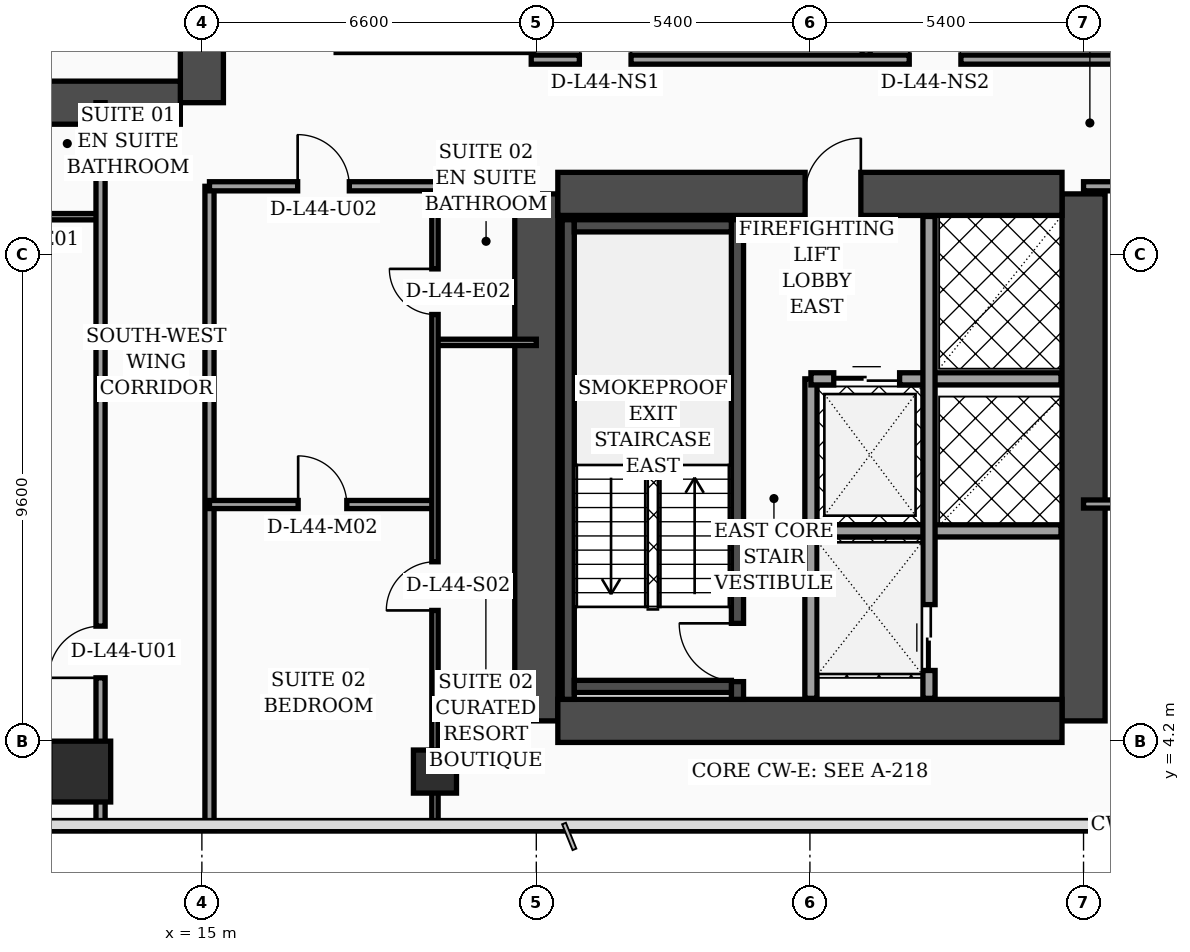
"""IFC4 building model, lengths in metres.
Left out: names, types, materials, properties, quantities, classifications, styles, units other than length and angle.
Written with IfcOpenShell. Run it as: python <this file> out.ifc"""

import sys

from ifc_helpers import new_model, si_unit, direction, frame, frame_2d, origin, origin_2d, place, context, subcontext, project, spatial, rectangle, hollow_rectangle, extrude, element, fill, save


model = new_model("IFC4")
c1 = context("Model", 3, precision=1e-05, world=origin(), true_north=direction((0.0, 1.0)))
c2 = subcontext(c1, "Body", "Model", "MODEL_VIEW")
j1 = project(units=[si_unit("LENGTHUNIT", "METRE"), si_unit("PLANEANGLEUNIT", "RADIAN")], contexts=[c1])
p1 = place(None, origin())
s1 = spatial("IfcSite", under=j1, at=p1, CompositionType="ELEMENT")
p2 = place(p1, origin())
s2 = spatial("IfcBuilding", under=s1, at=p2, CompositionType="ELEMENT")
p3 = place(p2, frame((0.0, 0.0, 178.9)))
s3 = spatial("IfcBuildingStorey", under=s2, at=p3, CompositionType="ELEMENT", Elevation=178.9)
p4 = place(p3, frame((15.0, 16.8, 0.0), z_axis=(0.0, 0.0, 1.0), x_axis=(0.0, 1.0, 0.0)))
e1 = element("IfcWall", 1, at=p4, inside=s3, PredefinedType="SHEAR", context=c2, shape_type="SweptSolid", body=[
    extrude(rectangle(XDim=21.6, YDim=0.85, at=frame_2d((10.8, 0.0))), origin(), (0.0, 0.0, 1.0), 3.56),
])
p5 = place(p4, frame((8.65, 0.0, 0.0)))
e2 = element("IfcOpeningElement", 2, at=p5, cuts=e1, PredefinedType="OPENING", context=c2, shape_type="SweptSolid", body=[
    extrude(rectangle(XDim=1.1, YDim=2.2, at=frame_2d((0.55, 1.1))), frame((0.0, 0.435, 0.0), z_axis=(0.0, -1.0, 0.0), x_axis=(1.0, 0.0, 0.0)), (0.0, 0.0, 1.0), 0.87),
])
p6 = place(p4, frame((10.85, 0.0, 0.0)))
e3 = element("IfcOpeningElement", 3, at=p6, cuts=e1, PredefinedType="OPENING", context=c2, shape_type="SweptSolid", body=[
    extrude(rectangle(XDim=1.1, YDim=2.2, at=frame_2d((0.55, 1.1))), frame((0.0, 0.435, 0.0), z_axis=(0.0, -1.0, 0.0), x_axis=(1.0, 0.0, 0.0)), (0.0, 0.0, 1.0), 0.87),
])
p7 = place(p4, frame((13.5, 0.0, 0.0)))
e4 = element("IfcOpeningElement", 4, at=p7, cuts=e1, PredefinedType="OPENING", context=c2, shape_type="SweptSolid", body=[
    extrude(rectangle(XDim=1.1, YDim=2.2, at=frame_2d((0.55, 1.1))), frame((0.0, 0.435, 0.0), z_axis=(0.0, -1.0, 0.0), x_axis=(1.0, 0.0, 0.0)), (0.0, 0.0, 1.0), 0.87),
])
p8 = place(p4, frame((16.15, 0.0, 0.0)))
e5 = element("IfcOpeningElement", 5, at=p8, cuts=e1, PredefinedType="OPENING", context=c2, shape_type="SweptSolid", body=[
    extrude(rectangle(XDim=1.1, YDim=2.2, at=frame_2d((0.55, 1.1))), frame((0.0, 0.435, 0.0), z_axis=(0.0, -1.0, 0.0), x_axis=(1.0, 0.0, 0.0)), (0.0, 0.0, 1.0), 0.87),
])
p9 = place(p3, frame((4.625, 16.8, 0.0), z_axis=(0.0, 0.0, 1.0), x_axis=(1.0, 0.0, 0.0)))
e6 = element("IfcWall", 6, at=p9, inside=s3, PredefinedType="SHEAR", context=c2, shape_type="SweptSolid", body=[
    extrude(rectangle(XDim=9.95, YDim=0.85, at=frame_2d((4.975, 0.0))), origin(), (0.0, 0.0, 1.0), 3.56),
])
for number, where, z_axis, x_axis in (
    (7, (21.6, 4.6, 0.0), (0.0, 0.0, 1.0), (0.0, 1.0, 0.0)),
    (8, (32.4, 4.6, 0.0), (0.0, 0.0, 1.0), (0.0, 1.0, 0.0)),
):
    element("IfcWall", number, at=place(p3, frame(where, z_axis=z_axis, x_axis=x_axis)), inside=s3, PredefinedType="SHEAR", context=c2, shape_type="SweptSolid", body=[
        extrude(rectangle(XDim=10.4, YDim=0.85, at=frame_2d((5.2, 0.0))), origin(), (0.0, 0.0, 1.0), 3.56),
    ])
p10 = place(p3, frame((22.025, 15.0, 0.0), z_axis=(0.0, 0.0, 1.0), x_axis=(1.0, 0.0, 0.0)))
e9 = element("IfcWall", 9, at=p10, inside=s3, PredefinedType="SHEAR", context=c2, shape_type="SweptSolid", body=[
    extrude(rectangle(XDim=9.95, YDim=0.85, at=frame_2d((4.975, 0.0))), origin(), (0.0, 0.0, 1.0), 3.56),
])
p11 = place(p10, frame((4.88, 0.0, 0.0)))
e10 = element("IfcOpeningElement", 10, at=p11, cuts=e9, PredefinedType="OPENING", context=c2, shape_type="SweptSolid", body=[
    extrude(rectangle(XDim=1.1, YDim=2.2, at=frame_2d((0.55, 1.1))), frame((0.0, 0.435, 0.0), z_axis=(0.0, -1.0, 0.0), x_axis=(1.0, 0.0, 0.0)), (0.0, 0.0, 1.0), 0.87),
])
p12 = place(p3, frame((22.025, 4.6, 0.0), z_axis=(0.0, 0.0, 1.0), x_axis=(1.0, 0.0, 0.0)))
e11 = element("IfcWall", 11, at=p12, inside=s3, PredefinedType="SHEAR", context=c2, shape_type="SweptSolid", body=[
    extrude(rectangle(XDim=9.95, YDim=0.85, at=frame_2d((4.975, 0.0))), origin(), (0.0, 0.0, 1.0), 3.56),
])
p13 = place(p3, frame((22.23, 5.025, 0.0), z_axis=(0.0, 0.0, 1.0), x_axis=(0.0, 1.0, 0.0)))
e12 = element("IfcWall", 12, at=p13, inside=s3, PredefinedType="SOLIDWALL", context=c2, shape_type="SweptSolid", body=[
    extrude(rectangle(XDim=9.465, YDim=0.24, at=frame_2d((4.732, 0.0))), origin(), (0.0, 0.0, 1.0), 3.56),
])
p14 = place(p3, frame((25.57, 5.025, 0.0), z_axis=(0.0, 0.0, 1.0), x_axis=(0.0, 1.0, 0.0)))
e13 = element("IfcWall", 13, at=p14, inside=s3, PredefinedType="SOLIDWALL", context=c2, shape_type="SweptSolid", body=[
    extrude(rectangle(XDim=9.465, YDim=0.24, at=frame_2d((4.732, 0.0))), origin(), (0.0, 0.0, 1.0), 3.56),
])
p15 = place(p14, frame((0.35, 0.0, 0.0)))
e14 = element("IfcOpeningElement", 14, at=p15, cuts=e13, PredefinedType="OPENING", context=c2, shape_type="SweptSolid", body=[
    extrude(rectangle(XDim=1.15, YDim=2.2, at=frame_2d((0.575, 1.1))), frame((0.0, 0.13, 0.0), z_axis=(0.0, -1.0, 0.0), x_axis=(1.0, 0.0, 0.0)), (0.0, 0.0, 1.0), 0.26),
])
for number, where, z_axis, x_axis in (
    (15, (22.35, 5.28, 0.0), (0.0, 0.0, 1.0), (1.0, 0.0, 0.0)),
    (16, (22.35, 14.37, 0.0), (0.0, 0.0, 1.0), (1.0, 0.0, 0.0)),
):
    element("IfcWall", number, at=place(p3, frame(where, z_axis=z_axis, x_axis=x_axis)), inside=s3, PredefinedType="SOLIDWALL", context=c2, shape_type="SweptSolid", body=[
        extrude(rectangle(XDim=3.1, YDim=0.24, at=frame_2d((1.55, 0.0))), origin(), (0.0, 0.0, 1.0), 3.56),
    ])
p16 = place(p3, frame((12.6, 3.6, 0.0), z_axis=(0.0, 0.0, 1.0), x_axis=(1.0, 0.0, 0.0)))
e17 = element("IfcColumn", 17, at=p16, inside=s3, PredefinedType="COLUMN", context=c2, shape_type="SweptSolid", body=[
    extrude(rectangle(XDim=1.2, YDim=1.2, at=origin_2d()), origin(), (0.0, 0.0, 1.0), 3.56),
])
p17 = place(p3, frame((19.6, 3.6, 0.0), z_axis=(0.0, 0.0, 1.0), x_axis=(1.0, 0.0, 0.0)))
e18 = element("IfcColumn", 18, at=p17, inside=s3, PredefinedType="COLUMN", context=c2, shape_type="SweptSolid", body=[
    extrude(hollow_rectangle(XDim=0.85, YDim=0.85, WallThickness=0.036, at=origin_2d()), origin(), (0.0, 0.0, 1.0), 3.56),
])
p18 = place(p3, frame((27.02, 5.045, 0.0), z_axis=(0.0, 0.0, 1.0), x_axis=(0.0, 1.0, 0.0)))
e19 = element("IfcWall", 19, at=p18, inside=s3, PredefinedType="SOLIDWALL", context=c2, shape_type="SweptSolid", body=[
    extrude(rectangle(XDim=6.305, YDim=0.24, at=frame_2d((3.153, 0.0))), origin(), (0.0, 0.0, 1.0), 3.56),
])
p19 = place(p3, frame((27.02, 11.35, 0.0), z_axis=(0.0, 0.0, 1.0), x_axis=(1.0, 0.0, 0.0)))
e20 = element("IfcWall", 20, at=p19, inside=s3, PredefinedType="SOLIDWALL", context=c2, shape_type="SweptSolid", body=[
    extrude(rectangle(XDim=4.935, YDim=0.24, at=frame_2d((2.468, 0.0))), origin(), (0.0, 0.0, 1.0), 3.56),
])
p20 = place(p19, frame((0.45, 0.0, 0.0)))
e21 = element("IfcOpeningElement", 21, at=p20, cuts=e20, PredefinedType="OPENING", context=c2, shape_type="SweptSolid", body=[
    extrude(rectangle(XDim=1.3, YDim=2.35, at=frame_2d((0.65, 1.175))), frame((0.0, 0.13, 0.0), z_axis=(0.0, -1.0, 0.0), x_axis=(1.0, 0.0, 0.0)), (0.0, 0.0, 1.0), 0.26),
])
p21 = place(p3, frame((27.02, 8.35, 0.0), z_axis=(0.0, 0.0, 1.0), x_axis=(1.0, 0.0, 0.0)))
e22 = element("IfcWall", 22, at=p21, inside=s3, PredefinedType="SOLIDWALL", context=c2, shape_type="SweptSolid", body=[
    extrude(rectangle(XDim=4.935, YDim=0.24, at=frame_2d((2.468, 0.0))), origin(), (0.0, 0.0, 1.0), 3.56),
])
p22 = place(p3, frame((29.35, 5.045, 0.0), z_axis=(0.0, 0.0, 1.0), x_axis=(0.0, 1.0, 0.0)))
e23 = element("IfcWall", 23, at=p22, inside=s3, PredefinedType="SOLIDWALL", context=c2, shape_type="SweptSolid", body=[
    extrude(rectangle(XDim=9.51, YDim=0.24, at=frame_2d((4.755, 0.0))), origin(), (0.0, 0.0, 1.0), 3.56),
])
p23 = place(p22, frame((0.55, 0.0, 0.0)))
e24 = element("IfcOpeningElement", 24, at=p23, cuts=e23, PredefinedType="OPENING", context=c2, shape_type="SweptSolid", body=[
    extrude(rectangle(XDim=1.3, YDim=2.35, at=frame_2d((0.65, 1.175))), frame((0.0, 0.13, 0.0), z_axis=(0.0, -1.0, 0.0), x_axis=(1.0, 0.0, 0.0)), (0.0, 0.0, 1.0), 0.26),
])
p24 = place(p3, frame((3.2, 14.55, 0.0), z_axis=(0.0, 0.0, 1.0), x_axis=(1.0, 0.0, 0.0)))
e25 = element("IfcWall", 25, at=p24, inside=s3, PredefinedType="PARTITIONING", context=c2, shape_type="SweptSolid", body=[
    extrude(rectangle(XDim=9.8, YDim=0.125, at=frame_2d((4.9, 0.0))), origin(), (0.0, 0.0, 1.0), 2.94),
])
p25 = place(p24, frame((3.32, 0.0, 0.0)))
e26 = element("IfcOpeningElement", 26, at=p25, cuts=e25, PredefinedType="OPENING", context=c2, shape_type="SweptSolid", body=[
    extrude(rectangle(XDim=0.96, YDim=2.2, at=frame_2d((0.48, 1.1))), frame((0.0, 0.073, 0.0), z_axis=(0.0, -1.0, 0.0), x_axis=(1.0, 0.0, 0.0)), (0.0, 0.0, 1.0), 0.145),
])
p26 = place(p24, frame((7.89, 0.0, 0.0)))
e27 = element("IfcOpeningElement", 27, at=p26, cuts=e25, PredefinedType="OPENING", context=c2, shape_type="SweptSolid", body=[
    extrude(rectangle(XDim=0.9, YDim=2.15, at=frame_2d((0.45, 1.075))), frame((0.0, 0.073, 0.0), z_axis=(0.0, -1.0, 0.0), x_axis=(1.0, 0.0, 0.0)), (0.0, 0.0, 1.0), 0.145),
])
p27 = place(p3, frame((13.0, 2.44, 0.0), z_axis=(0.0, 0.0, 1.0), x_axis=(0.0, 1.0, 0.0)))
e28 = element("IfcWall", 28, at=p27, inside=s3, PredefinedType="PARTITIONING", context=c2, shape_type="SweptSolid", body=[
    extrude(rectangle(XDim=14.36, YDim=0.18, at=frame_2d((7.18, 0.0))), origin(), (0.0, 0.0, 1.0), 2.94),
])
p28 = place(p27, frame((3.01, 0.0, 0.0)))
e29 = element("IfcOpeningElement", 29, at=p28, cuts=e28, PredefinedType="OPENING", context=c2, shape_type="SweptSolid", body=[
    extrude(rectangle(XDim=1.02, YDim=2.2, at=frame_2d((0.51, 1.1))), frame((0.0, 0.1, 0.0), z_axis=(0.0, -1.0, 0.0), x_axis=(1.0, 0.0, 0.0)), (0.0, 0.0, 1.0), 0.2),
])
p29 = place(p3, frame((15.15, 2.44, 0.0), z_axis=(0.0, 0.0, 1.0), x_axis=(0.0, 1.0, 0.0)))
e30 = element("IfcWall", 30, at=p29, inside=s3, PredefinedType="PARTITIONING", context=c2, shape_type="SweptSolid", body=[
    extrude(rectangle(XDim=12.71, YDim=0.18, at=frame_2d((6.355, 0.0))), origin(), (0.0, 0.0, 1.0), 3.04),
])
p30 = place(p3, frame((19.6, 12.07, 0.0), z_axis=(0.0, 0.0, 1.0), x_axis=(1.0, 0.0, 0.0)))
e31 = element("IfcWall", 31, at=p30, inside=s3, PredefinedType="PARTITIONING", context=c2, shape_type="SweptSolid", body=[
    extrude(rectangle(XDim=2.0, YDim=0.125, at=frame_2d((1.0, 0.0))), origin(), (0.0, 0.0, 1.0), 3.56),
])
p31 = place(p3, frame((15.15, 8.87, 0.0), z_axis=(0.0, 0.0, 1.0), x_axis=(1.0, 0.0, 0.0)))
e32 = element("IfcWall", 32, at=p31, inside=s3, PredefinedType="PARTITIONING", context=c2, shape_type="SweptSolid", body=[
    extrude(rectangle(XDim=4.45, YDim=0.16, at=frame_2d((2.225, 0.0))), origin(), (0.0, 0.0, 1.0), 3.56),
])
p32 = place(p31, frame((1.75, 0.0, 0.0)))
e33 = element("IfcOpeningElement", 33, at=p32, cuts=e32, PredefinedType="OPENING", context=c2, shape_type="SweptSolid", body=[
    extrude(rectangle(XDim=0.96, YDim=2.2, at=frame_2d((0.48, 1.1))), frame((0.0, 0.09, 0.0), z_axis=(0.0, -1.0, 0.0), x_axis=(1.0, 0.0, 0.0)), (0.0, 0.0, 1.0), 0.18),
])
p33 = place(p3, frame((19.6, 2.44, 0.0), z_axis=(0.0, 0.0, 1.0), x_axis=(0.0, 1.0, 0.0)))
e34 = element("IfcWall", 34, at=p33, inside=s3, PredefinedType="PARTITIONING", context=c2, shape_type="SweptSolid", body=[
    extrude(rectangle(XDim=12.71, YDim=0.125, at=frame_2d((6.355, 0.0))), origin(), (0.0, 0.0, 1.0), 2.49),
])
p34 = place(p33, frame((4.34, 0.0, 0.0)))
e35 = element("IfcOpeningElement", 35, at=p34, cuts=e34, PredefinedType="OPENING", context=c2, shape_type="SweptSolid", body=[
    extrude(rectangle(XDim=0.96, YDim=2.2, at=frame_2d((0.48, 1.1))), frame((0.0, 0.073, 0.0), z_axis=(0.0, -1.0, 0.0), x_axis=(1.0, 0.0, 0.0)), (0.0, 0.0, 1.0), 0.145),
])
p35 = place(p33, frame((10.18, 0.0, 0.0)))
e36 = element("IfcOpeningElement", 36, at=p35, cuts=e34, PredefinedType="OPENING", context=c2, shape_type="SweptSolid", body=[
    extrude(rectangle(XDim=0.9, YDim=2.15, at=frame_2d((0.45, 1.075))), frame((0.0, 0.073, 0.0), z_axis=(0.0, -1.0, 0.0), x_axis=(1.0, 0.0, 0.0)), (0.0, 0.0, 1.0), 0.145),
])
p36 = place(p3, frame((15.15, 15.15, 0.0), z_axis=(0.0, 0.0, 1.0), x_axis=(1.0, 0.0, 0.0)))
e37 = element("IfcWall", 37, at=p36, inside=s3, PredefinedType="PARTITIONING", context=c2, shape_type="SweptSolid", body=[
    extrude(rectangle(XDim=6.45, YDim=0.18, at=frame_2d((3.225, 0.0))), origin(), (0.0, 0.0, 1.0), 2.49),
])
p37 = place(p36, frame((1.74, 0.0, 0.0)))
e38 = element("IfcOpeningElement", 38, at=p37, cuts=e37, PredefinedType="OPENING", context=c2, shape_type="SweptSolid", body=[
    extrude(rectangle(XDim=1.02, YDim=2.2, at=frame_2d((0.51, 1.1))), frame((0.0, 0.1, 0.0), z_axis=(0.0, -1.0, 0.0), x_axis=(1.0, 0.0, 0.0)), (0.0, 0.0, 1.0), 0.2),
])
p38 = place(p3, frame((17.65, 17.88, 0.0), z_axis=(0.0, 0.0, 1.0), x_axis=(1.0, 0.0, 0.0)))
e39 = element("IfcWall", 39, at=p38, inside=s3, PredefinedType="PARTITIONING", context=c2, shape_type="SweptSolid", body=[
    extrude(rectangle(XDim=3.9, YDim=0.18, at=frame_2d((1.95, 0.0))), origin(), (0.0, 0.0, 1.0), 3.56),
])
p39 = place(p3, frame((32.4, 8.88, 0.0), z_axis=(0.0, 0.0, 1.0), x_axis=(1.0, 0.0, 0.0)))
e40 = element("IfcWall", 40, at=p39, inside=s3, PredefinedType="PARTITIONING", context=c2, shape_type="SweptSolid", body=[
    extrude(rectangle(XDim=4.15, YDim=0.16, at=frame_2d((2.075, 0.0))), origin(), (0.0, 0.0, 1.0), 2.94),
])
p40 = place(p39, frame((1.59, 0.0, 0.0)))
e41 = element("IfcOpeningElement", 41, at=p40, cuts=e40, PredefinedType="OPENING", context=c2, shape_type="SweptSolid", body=[
    extrude(rectangle(XDim=0.96, YDim=2.2, at=frame_2d((0.48, 1.1))), frame((0.0, 0.09, 0.0), z_axis=(0.0, -1.0, 0.0), x_axis=(1.0, 0.0, 0.0)), (0.0, 0.0, 1.0), 0.18),
])
p41 = place(p3, frame((32.4, 15.15, 0.0), z_axis=(0.0, 0.0, 1.0), x_axis=(1.0, 0.0, 0.0)))
e42 = element("IfcWall", 42, at=p41, inside=s3, PredefinedType="PARTITIONING", context=c2, shape_type="SweptSolid", body=[
    extrude(rectangle(XDim=15.0, YDim=0.18, at=frame_2d((7.5, 0.0))), origin(), (0.0, 0.0, 1.0), 2.94),
])
p42 = place(p41, frame((1.66, 0.0, 0.0)))
e43 = element("IfcOpeningElement", 43, at=p42, cuts=e42, PredefinedType="OPENING", context=c2, shape_type="SweptSolid", body=[
    extrude(rectangle(XDim=1.02, YDim=2.2, at=frame_2d((0.51, 1.1))), frame((0.0, 0.1, 0.0), z_axis=(0.0, -1.0, 0.0), x_axis=(1.0, 0.0, 0.0)), (0.0, 0.0, 1.0), 0.2),
])
p43 = place(p41, frame((10.79, 0.0, 0.0)))
e44 = element("IfcOpeningElement", 44, at=p43, cuts=e42, PredefinedType="OPENING", context=c2, shape_type="SweptSolid", body=[
    extrude(rectangle(XDim=1.02, YDim=2.2, at=frame_2d((0.51, 1.1))), frame((0.0, 0.1, 0.0), z_axis=(0.0, -1.0, 0.0), x_axis=(1.0, 0.0, 0.0)), (0.0, 0.0, 1.0), 0.2),
])
p44 = place(p41, frame((6.62, 0.0, 0.0)))
e45 = element("IfcOpeningElement", 45, at=p44, cuts=e42, PredefinedType="OPENING", context=c2, shape_type="SweptSolid", body=[
    extrude(rectangle(XDim=1.02, YDim=2.2, at=frame_2d((0.51, 1.1))), frame((0.0, 0.1, 0.0), z_axis=(0.0, -1.0, 0.0), x_axis=(1.0, 0.0, 0.0)), (0.0, 0.0, 1.0), 0.2),
])
p45 = place(p3, frame((28.11, 17.65, 0.0), z_axis=(0.0, 0.0, 1.0), x_axis=(0.0, 1.0, 0.0)))
e46 = element("IfcWall", 46, at=p45, inside=s3, PredefinedType="PARTITIONING", context=c2, shape_type="SweptSolid", body=[
    extrude(rectangle(XDim=10.46, YDim=0.16, at=frame_2d((5.23, 0.0))), origin(), (0.0, 0.0, 1.0), 2.94),
])
p46 = place(p3, frame((21.5, 17.65, 0.0), z_axis=(0.0, 0.0, 1.0), x_axis=(1.0, 0.0, 0.0)))
e47 = element("IfcWall", 47, at=p46, inside=s3, PredefinedType="PARTITIONING", context=c2, shape_type="SweptSolid", body=[
    extrude(rectangle(XDim=23.55, YDim=0.18, at=frame_2d((11.775, 0.0))), origin(), (0.0, 0.0, 1.0), 2.94),
])
p47 = place(p46, frame((0.95, 0.0, 0.0)))
e48 = element("IfcOpeningElement", 48, at=p47, cuts=e47, PredefinedType="OPENING", context=c2, shape_type="SweptSolid", body=[
    extrude(rectangle(XDim=1.02, YDim=2.2, at=frame_2d((0.51, 1.1))), frame((0.0, 0.1, 0.0), z_axis=(0.0, -1.0, 0.0), x_axis=(1.0, 0.0, 0.0)), (0.0, 0.0, 1.0), 0.2),
])
p48 = place(p46, frame((7.46, 0.0, 0.0)))
e49 = element("IfcOpeningElement", 49, at=p48, cuts=e47, PredefinedType="OPENING", context=c2, shape_type="SweptSolid", body=[
    extrude(rectangle(XDim=1.02, YDim=2.2, at=frame_2d((0.51, 1.1))), frame((0.0, 0.1, 0.0), z_axis=(0.0, -1.0, 0.0), x_axis=(1.0, 0.0, 0.0)), (0.0, 0.0, 1.0), 0.2),
])
p49 = place(p46, frame((12.68, 0.0, 0.0)))
e50 = element("IfcOpeningElement", 50, at=p49, cuts=e47, PredefinedType="OPENING", context=c2, shape_type="SweptSolid", body=[
    extrude(rectangle(XDim=1.02, YDim=2.2, at=frame_2d((0.51, 1.1))), frame((0.0, 0.1, 0.0), z_axis=(0.0, -1.0, 0.0), x_axis=(1.0, 0.0, 0.0)), (0.0, 0.0, 1.0), 0.2),
])
p50 = place(p46, frame((18.54, 0.0, 0.0)))
e51 = element("IfcOpeningElement", 51, at=p50, cuts=e47, PredefinedType="OPENING", context=c2, shape_type="SweptSolid", body=[
    extrude(rectangle(XDim=1.02, YDim=2.2, at=frame_2d((0.51, 1.1))), frame((0.0, 0.1, 0.0), z_axis=(0.0, -1.0, 0.0), x_axis=(1.0, 0.0, 0.0)), (0.0, 0.0, 1.0), 0.2),
])
p51 = place(p20, origin())
e52 = element("IfcDoor", 52, at=p51, inside=s3, OperationType="DOUBLE_DOOR_SLIDING", PredefinedType="DOOR", context=c2, shape_type="SweptSolid", body=[
    extrude(rectangle(XDim=1.3, YDim=2.35, at=frame_2d((0.65, 1.175))), frame((0.0, 0.025, 0.0), z_axis=(0.0, -1.0, 0.0), x_axis=(1.0, 0.0, 0.0)), (0.0, 0.0, 1.0), 0.05),
])
fill(e21, e52)
p52 = place(p23, origin())
e53 = element("IfcDoor", 53, at=p52, inside=s3, OperationType="DOUBLE_DOOR_SLIDING", PredefinedType="DOOR", context=c2, shape_type="SweptSolid", body=[
    extrude(rectangle(XDim=1.3, YDim=2.35, at=frame_2d((0.65, 1.175))), frame((0.0, 0.025, 0.0), z_axis=(0.0, -1.0, 0.0), x_axis=(1.0, 0.0, 0.0)), (0.0, 0.0, 1.0), 0.05),
])
fill(e24, e53)
p53 = place(p28, origin())
e54 = element("IfcDoor", 54, at=p53, inside=s3, OperationType="SINGLE_SWING_LEFT", PredefinedType="DOOR", context=c2, shape_type="SweptSolid", body=[
    extrude(rectangle(XDim=1.02, YDim=2.2, at=frame_2d((0.51, 1.1))), frame((0.0, 0.025, 0.0), z_axis=(0.0, -1.0, 0.0), x_axis=(1.0, 0.0, 0.0)), (0.0, 0.0, 1.0), 0.05),
])
fill(e29, e54)
p54 = place(p32, origin())
e55 = element("IfcDoor", 55, at=p54, inside=s3, OperationType="SINGLE_SWING_LEFT", PredefinedType="DOOR", context=c2, shape_type="SweptSolid", body=[
    extrude(rectangle(XDim=0.96, YDim=2.2, at=frame_2d((0.48, 1.1))), frame((0.0, 0.025, 0.0), z_axis=(0.0, -1.0, 0.0), x_axis=(1.0, 0.0, 0.0)), (0.0, 0.0, 1.0), 0.05),
])
fill(e33, e55)
p55 = place(p34, origin())
e56 = element("IfcDoor", 56, at=p55, inside=s3, OperationType="SINGLE_SWING_LEFT", PredefinedType="DOOR", context=c2, shape_type="SweptSolid", body=[
    extrude(rectangle(XDim=0.96, YDim=2.2, at=frame_2d((0.48, 1.1))), frame((0.0, 0.025, 0.0), z_axis=(0.0, -1.0, 0.0), x_axis=(1.0, 0.0, 0.0)), (0.0, 0.0, 1.0), 0.05),
])
fill(e35, e56)
p56 = place(p35, origin())
e57 = element("IfcDoor", 57, at=p56, inside=s3, OperationType="SINGLE_SWING_RIGHT", PredefinedType="DOOR", context=c2, shape_type="SweptSolid", body=[
    extrude(rectangle(XDim=0.9, YDim=2.15, at=frame_2d((0.45, 1.075))), frame((0.0, 0.025, 0.0), z_axis=(0.0, -1.0, 0.0), x_axis=(1.0, 0.0, 0.0)), (0.0, 0.0, 1.0), 0.05),
])
fill(e36, e57)
p57 = place(p37, origin())
e58 = element("IfcDoor", 58, at=p57, inside=s3, OperationType="SINGLE_SWING_LEFT", PredefinedType="DOOR", context=c2, shape_type="SweptSolid", body=[
    extrude(rectangle(XDim=1.02, YDim=2.2, at=frame_2d((0.51, 1.1))), frame((0.0, 0.025, 0.0), z_axis=(0.0, -1.0, 0.0), x_axis=(1.0, 0.0, 0.0)), (0.0, 0.0, 1.0), 0.05),
])
fill(e38, e58)
p58 = place(p47, origin())
e59 = element("IfcDoor", 59, at=p58, inside=s3, OperationType="SINGLE_SWING_RIGHT", PredefinedType="DOOR", context=c2, shape_type="SweptSolid", body=[
    extrude(rectangle(XDim=1.02, YDim=2.2, at=frame_2d((0.51, 1.1))), frame((0.0, 0.025, 0.0), z_axis=(0.0, -1.0, 0.0), x_axis=(1.0, 0.0, 0.0)), (0.0, 0.0, 1.0), 0.05),
])
fill(e48, e59)
p59 = place(p48, origin())
e60 = element("IfcDoor", 60, at=p59, inside=s3, OperationType="SINGLE_SWING_LEFT", PredefinedType="DOOR", context=c2, shape_type="SweptSolid", body=[
    extrude(rectangle(XDim=1.02, YDim=2.2, at=frame_2d((0.51, 1.1))), frame((0.0, 0.025, 0.0), z_axis=(0.0, -1.0, 0.0), x_axis=(1.0, 0.0, 0.0)), (0.0, 0.0, 1.0), 0.05),
])
fill(e49, e60)
p60 = place(p15, origin())
e61 = element("IfcDoor", 61, at=p60, inside=s3, OperationType="SINGLE_SWING_RIGHT", PredefinedType="DOOR", context=c2, shape_type="SweptSolid", body=[
    extrude(rectangle(XDim=1.15, YDim=2.2, at=frame_2d((0.575, 1.1))), frame((0.0, 0.025, 0.0), z_axis=(0.0, -1.0, 0.0), x_axis=(1.0, 0.0, 0.0)), (0.0, 0.0, 1.0), 0.05),
])
fill(e14, e61)
p61 = place(p11, origin())
e62 = element("IfcDoor", 62, at=p61, inside=s3, OperationType="SINGLE_SWING_RIGHT", PredefinedType="DOOR", context=c2, shape_type="SweptSolid", body=[
    extrude(rectangle(XDim=1.1, YDim=2.2, at=frame_2d((0.55, 1.1))), frame((0.0, 0.025, 0.0), z_axis=(0.0, -1.0, 0.0), x_axis=(1.0, 0.0, 0.0)), (0.0, 0.0, 1.0), 0.05),
])
fill(e10, e62)
save(model, sys.argv[1])
